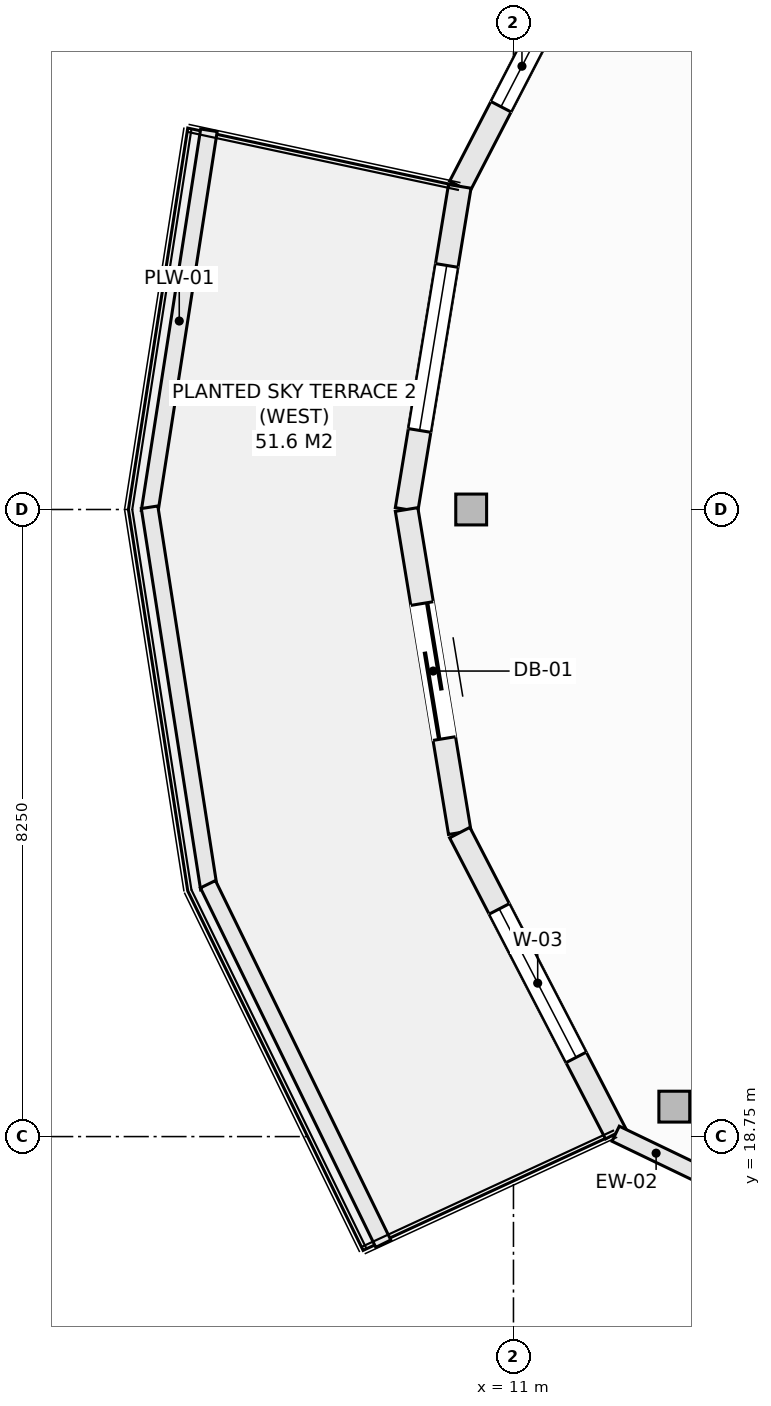
"""IFC4 building model, lengths in metres.
Left out: names, types, materials, properties, quantities, classifications, styles, units other than length and angle.
Written with IfcOpenShell. Run it as: python <this file> out.ifc"""

import sys

from ifc_helpers import new_model, si_unit, direction, frame, frame_2d, origin, origin_2d, place, context, subcontext, project, spatial, rectangle, hollow_rectangle, extrude, element, fill, save


model = new_model("IFC4")
c1 = context("Model", 3, precision=1e-05, world=origin(), true_north=direction((0.0, 1.0)))
c2 = subcontext(c1, "Body", "Model", "MODEL_VIEW")
j1 = project(units=[si_unit("LENGTHUNIT", "METRE"), si_unit("PLANEANGLEUNIT", "RADIAN")], contexts=[c1])
p1 = place(None, origin())
s1 = spatial("IfcSite", under=j1, at=p1, CompositionType="ELEMENT")
p2 = place(p1, origin())
s2 = spatial("IfcBuilding", under=s1, at=p2, CompositionType="ELEMENT")
p3 = place(p2, frame((0.0, 0.0, 265.7)))
s3 = spatial("IfcBuildingStorey", under=s2, at=p3, CompositionType="ELEMENT", Elevation=265.7)
for number, where, z_axis, x_axis in (
    (1, (10.444, 27.0, -0.27), (0.0, 0.0, 1.0), (1.0, 0.0, 0.0)),
    (2, (13.116, 19.144, -0.27), (0.0, 0.0, 1.0), (1.0, 0.0, 0.0)),
):
    element("IfcColumn", number, at=place(p3, frame(where, z_axis=z_axis, x_axis=x_axis)), inside=s3, PredefinedType="COLUMN", context=c2, shape_type="SweptSolid", body=[
        extrude(hollow_rectangle(XDim=0.406, YDim=0.406, WallThickness=0.016, at=origin_2d()), origin(), (0.0, 0.0, 1.0), 3.3),
    ])
p4 = place(p3, frame((10.293, 31.251, 0.0), z_axis=(0.0, 0.0, 1.0), x_axis=(0.459801070243, 0.888021945564, 0.0)))
e3 = element("IfcWall", 3, at=p4, inside=s3, PredefinedType="SOLIDWALL", context=c2, shape_type="SweptSolid", body=[
    extrude(rectangle(XDim=4.461, YDim=0.3, at=frame_2d((2.23, 0.0))), origin(), (0.0, 0.0, 1.0), 2.605),
])
p5 = place(p4, frame((1.18, 0.0, 0.72)))
e4 = element("IfcOpeningElement", 4, at=p5, cuts=e3, PredefinedType="OPENING", context=c2, shape_type="SweptSolid", body=[
    extrude(rectangle(XDim=1.2, YDim=1.65, at=frame_2d((0.6, 0.825))), frame((0.0, 0.16, 0.0), z_axis=(0.0, -1.0, 0.0), x_axis=(1.0, 0.0, 0.0)), (0.0, 0.0, 1.0), 0.32),
])
p6 = place(p3, frame((9.594, 27.0, 0.0), z_axis=(0.0, 0.0, 1.0), x_axis=(0.162404622434, 0.98672424649, 0.0)))
e5 = element("IfcWall", 5, at=p6, inside=s3, PredefinedType="SOLIDWALL", context=c2, shape_type="SweptSolid", body=[
    extrude(rectangle(XDim=4.308, YDim=0.3, at=frame_2d((2.154, 0.0))), origin(), (0.0, 0.0, 1.0), 2.605),
])
p7 = place(p6, frame((1.054, 0.0, 0.72)))
e6 = element("IfcOpeningElement", 6, at=p7, cuts=e5, PredefinedType="OPENING", context=c2, shape_type="SweptSolid", body=[
    extrude(rectangle(XDim=2.2, YDim=1.65, at=frame_2d((1.1, 0.825))), frame((0.0, 0.16, 0.0), z_axis=(0.0, -1.0, 0.0), x_axis=(1.0, 0.0, 0.0)), (0.0, 0.0, 1.0), 0.32),
])
p8 = place(p3, frame((9.594, 27.0, 0.0), z_axis=(0.0, 0.0, 1.0), x_axis=(0.162404622434, -0.98672424649, 0.0)))
e7 = element("IfcWall", 7, at=p8, inside=s3, PredefinedType="SOLIDWALL", context=c2, shape_type="SweptSolid", body=[
    extrude(rectangle(XDim=4.308, YDim=0.3, at=frame_2d((2.154, 0.0))), origin(), (0.0, 0.0, 1.0), 2.605),
])
p9 = place(p8, frame((1.254, 0.0, 0.0)))
e8 = element("IfcOpeningElement", 8, at=p9, cuts=e7, PredefinedType="OPENING", context=c2, shape_type="SweptSolid", body=[
    extrude(rectangle(XDim=1.8, YDim=2.25, at=frame_2d((0.9, 1.125))), frame((0.0, 0.16, 0.0), z_axis=(0.0, -1.0, 0.0), x_axis=(1.0, 0.0, 0.0)), (0.0, 0.0, 1.0), 0.32),
])
p10 = place(p3, frame((10.293, 22.749, 0.0), z_axis=(0.0, 0.0, 1.0), x_axis=(0.459801070243, -0.888021945564, 0.0)))
e9 = element("IfcWall", 9, at=p10, inside=s3, PredefinedType="SOLIDWALL", context=c2, shape_type="SweptSolid", body=[
    extrude(rectangle(XDim=4.461, YDim=0.3, at=frame_2d((2.23, 0.0))), origin(), (0.0, 0.0, 1.0), 2.605),
])
p11 = place(p10, frame((1.13, 0.0, 0.72)))
e10 = element("IfcOpeningElement", 10, at=p11, cuts=e9, PredefinedType="OPENING", context=c2, shape_type="SweptSolid", body=[
    extrude(rectangle(XDim=2.2, YDim=1.65, at=frame_2d((1.1, 0.825))), frame((0.0, 0.16, 0.0), z_axis=(0.0, -1.0, 0.0), x_axis=(1.0, 0.0, 0.0)), (0.0, 0.0, 1.0), 0.32),
])
p12 = place(p3, frame((12.344, 18.788, 0.0), z_axis=(0.0, 0.0, 1.0), x_axis=(0.901264843027, -0.433268603437, 0.0)))
e11 = element("IfcWall", 11, at=p12, inside=s3, PredefinedType="SOLIDWALL", context=c2, shape_type="SweptSolid", body=[
    extrude(rectangle(XDim=1.181, YDim=0.22, at=frame_2d((0.591, 0.0))), origin(), (0.0, 0.0, 1.0), 2.605),
])
for number, where, z_axis, x_axis in (
    (12, (6.212, 26.971, 0.0), (0.0, 0.0, 1.0), (0.154, 0.988, 0.0)),
    (13, (6.212, 27.029, 0.0), (0.0, 0.0, 1.0), (0.154, -0.988, 0.0)),
):
    element("IfcWall", number, at=place(p3, frame(where, z_axis=z_axis, x_axis=x_axis)), inside=s3, PredefinedType="PARAPET", context=c2, shape_type="SweptSolid", body=[
        extrude(rectangle(XDim=5.078, YDim=0.22, at=frame_2d((2.539, 0.0))), origin(), (0.0, 0.0, 1.0), 0.52),
    ])
p13 = place(p3, frame((6.98, 22.07, 0.0), z_axis=(0.0, 0.0, 1.0), x_axis=(0.438469339137, -0.898746148051, 0.0)))
e14 = element("IfcWall", 14, at=p13, inside=s3, PredefinedType="PARAPET", context=c2, shape_type="SweptSolid", body=[
    extrude(rectangle(XDim=5.262, YDim=0.22, at=frame_2d((2.631, 0.0))), origin(), (0.0, 0.0, 1.0), 0.52),
])
p14 = place(p5, origin())
e15 = element("IfcWindow", 15, at=p14, inside=s3, PartitioningType="SINGLE_PANEL", PredefinedType="WINDOW", context=c2, shape_type="SweptSolid", body=[
    extrude(rectangle(XDim=1.2, YDim=1.65, at=frame_2d((0.6, 0.825))), frame((0.0, 0.03, 0.0), z_axis=(0.0, -1.0, 0.0), x_axis=(1.0, 0.0, 0.0)), (0.0, 0.0, 1.0), 0.06),
])
fill(e4, e15)
p15 = place(p7, origin())
e16 = element("IfcWindow", 16, at=p15, inside=s3, PartitioningType="SINGLE_PANEL", PredefinedType="WINDOW", context=c2, shape_type="SweptSolid", body=[
    extrude(rectangle(XDim=2.2, YDim=1.65, at=frame_2d((1.1, 0.825))), frame((0.0, 0.03, 0.0), z_axis=(0.0, -1.0, 0.0), x_axis=(1.0, 0.0, 0.0)), (0.0, 0.0, 1.0), 0.06),
])
fill(e6, e16)
p16 = place(p9, frame((1.8, 0.0, 0.0), z_axis=(0.0, 0.0, 1.0), x_axis=(-1.0, 0.0, 0.0)))
e17 = element("IfcDoor", 17, at=p16, inside=s3, OperationType="SLIDING_TO_LEFT", PredefinedType="DOOR", context=c2, shape_type="SweptSolid", body=[
    extrude(rectangle(XDim=1.8, YDim=2.25, at=frame_2d((0.9, 1.125))), frame((0.0, 0.025, 0.0), z_axis=(0.0, -1.0, 0.0), x_axis=(1.0, 0.0, 0.0)), (0.0, 0.0, 1.0), 0.05),
])
fill(e8, e17)
p17 = place(p11, origin())
e18 = element("IfcWindow", 18, at=p17, inside=s3, PartitioningType="SINGLE_PANEL", PredefinedType="WINDOW", context=c2, shape_type="SweptSolid", body=[
    extrude(rectangle(XDim=2.2, YDim=1.65, at=frame_2d((1.1, 0.825))), frame((0.0, 0.03, 0.0), z_axis=(0.0, -1.0, 0.0), x_axis=(1.0, 0.0, 0.0)), (0.0, 0.0, 1.0), 0.06),
])
fill(e10, e18)
save(model, sys.argv[1])
